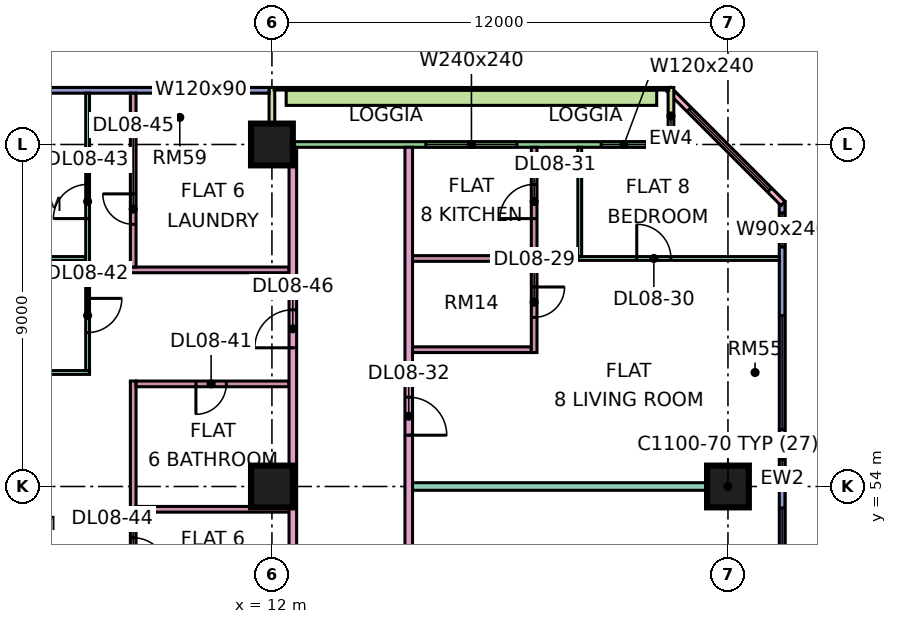
"""IFC4 building model, lengths in metres.
Left out: names, types, materials, properties, quantities, classifications, styles, units other than length and angle.
Written with IfcOpenShell. Run it as: python <this file> out.ifc"""

import sys

from ifc_helpers import new_model, si_unit, direction, frame, frame_2d, origin, origin_2d, place, context, subcontext, project, spatial, rectangle, extrude, element, fill, save


model = new_model("IFC4")
c1 = context("Model", 3, precision=1e-05, world=origin(), true_north=direction((0.0, 1.0)))
c2 = subcontext(c1, "Body", "Model", "MODEL_VIEW")
j1 = project(units=[si_unit("LENGTHUNIT", "METRE"), si_unit("PLANEANGLEUNIT", "RADIAN")], contexts=[c1])
p1 = place(None, origin())
s1 = spatial("IfcSite", under=j1, at=p1, CompositionType="ELEMENT")
p2 = place(p1, origin())
s2 = spatial("IfcBuilding", under=s1, at=p2, CompositionType="ELEMENT")
p3 = place(p2, frame((0.0, 0.0, 45.15)))
s3 = spatial("IfcBuildingStorey", under=s2, at=p3, CompositionType="ELEMENT", Elevation=45.15)
for number, where, z_axis, x_axis in (
    (1, (12.0, 54.0, 0.0), (0.0, 0.0, 1.0), (1.0, 0.0, 0.0)),
    (2, (12.0, 63.0, 0.0), (0.0, 0.0, 1.0), (1.0, 0.0, 0.0)),
    (3, (24.0, 54.0, 0.0), (0.0, 0.0, 1.0), (1.0, 0.0, 0.0)),
):
    element("IfcColumn", number, at=place(p3, frame(where, z_axis=z_axis, x_axis=x_axis)), inside=s3, PredefinedType="COLUMN", context=c2, shape_type="SweptSolid", body=[
        extrude(rectangle(XDim=1.1, YDim=1.1, at=origin_2d()), origin(), (0.0, 0.0, 1.0), 3.75),
    ])
p4 = place(p3, frame((25.425, 48.075, 0.0), z_axis=(0.0, 0.0, 1.0), x_axis=(0.0, 1.0, 0.0)))
e4 = element("IfcWall", 4, at=p4, inside=s3, PredefinedType="SOLIDWALL", context=c2, shape_type="SweptSolid", body=[
    extrude(rectangle(XDim=13.425, YDim=0.15, at=frame_2d((6.712, 0.0))), origin(), (0.0, 0.0, 1.0), 3.35),
])
p5 = place(p4, frame((0.562, 0.0, 0.45)))
e5 = element("IfcOpeningElement", 5, at=p5, cuts=e4, PredefinedType="OPENING", context=c2, shape_type="SweptSolid", body=[
    extrude(rectangle(XDim=4.8, YDim=2.4, at=frame_2d((2.4, 1.2))), frame((0.0, 0.085, 0.0), z_axis=(0.0, -1.0, 0.0), x_axis=(1.0, 0.0, 0.0)), (0.0, 0.0, 1.0), 0.17),
])
p6 = place(p4, frame((7.425, 0.0, 0.45)))
e6 = element("IfcOpeningElement", 6, at=p6, cuts=e4, PredefinedType="OPENING", context=c2, shape_type="SweptSolid", body=[
    extrude(rectangle(XDim=3.0, YDim=2.4, at=frame_2d((1.5, 1.2))), frame((0.0, 0.085, 0.0), z_axis=(0.0, -1.0, 0.0), x_axis=(1.0, 0.0, 0.0)), (0.0, 0.0, 1.0), 0.17),
])
p7 = place(p4, frame((12.225, 0.0, 0.45)))
e7 = element("IfcOpeningElement", 7, at=p7, cuts=e4, PredefinedType="OPENING", context=c2, shape_type="SweptSolid", body=[
    extrude(rectangle(XDim=0.9, YDim=2.4, at=frame_2d((0.45, 1.2))), frame((0.0, 0.085, 0.0), z_axis=(0.0, -1.0, 0.0), x_axis=(1.0, 0.0, 0.0)), (0.0, 0.0, 1.0), 0.17),
])
p8 = place(p3, frame((25.447, 61.447, 0.0), z_axis=(0.0, 0.0, 1.0), x_axis=(-0.707106781187, 0.707106781187, 0.0)))
e8 = element("IfcWall", 8, at=p8, inside=s3, PredefinedType="SOLIDWALL", context=c2, shape_type="SweptSolid", body=[
    extrude(rectangle(XDim=4.243, YDim=0.15, at=frame_2d((2.121, 0.0))), origin(), (0.0, 0.0, 1.0), 3.35),
])
p9 = place(p8, frame((0.498, 0.0, 0.45)))
e9 = element("IfcOpeningElement", 9, at=p9, cuts=e8, PredefinedType="OPENING", context=c2, shape_type="SweptSolid", body=[
    extrude(rectangle(XDim=3.0, YDim=2.4, at=frame_2d((1.5, 1.2))), frame((0.0, 0.085, 0.0), z_axis=(0.0, -1.0, 0.0), x_axis=(1.0, 0.0, 0.0)), (0.0, 0.0, 1.0), 0.17),
])
p10 = place(p3, frame((22.425, 63.0, 0.0), z_axis=(0.0, 0.0, 1.0), x_axis=(-1.0, 0.0, 0.0)))
e10 = element("IfcWall", 10, at=p10, inside=s3, PredefinedType="SOLIDWALL", context=c2, shape_type="SweptSolid", body=[
    extrude(rectangle(XDim=10.35, YDim=0.15, at=frame_2d((5.175, 0.0))), origin(), (0.0, 0.0, 1.0), 3.35),
])
p11 = place(p10, frame((0.562, 0.0, 0.45)))
e11 = element("IfcOpeningElement", 11, at=p11, cuts=e10, PredefinedType="OPENING", context=c2, shape_type="SweptSolid", body=[
    extrude(rectangle(XDim=1.2, YDim=2.4, at=frame_2d((0.6, 1.2))), frame((0.0, 0.085, 0.0), z_axis=(0.0, -1.0, 0.0), x_axis=(1.0, 0.0, 0.0)), (0.0, 0.0, 1.0), 0.17),
])
p12 = place(p10, frame((3.975, 0.0, 0.45)))
e12 = element("IfcOpeningElement", 12, at=p12, cuts=e10, PredefinedType="OPENING", context=c2, shape_type="SweptSolid", body=[
    extrude(rectangle(XDim=2.4, YDim=2.4, at=frame_2d((1.2, 1.2))), frame((0.0, 0.085, 0.0), z_axis=(0.0, -1.0, 0.0), x_axis=(1.0, 0.0, 0.0)), (0.0, 0.0, 1.0), 0.17),
])
for number, where, z_axis, x_axis in (
    (13, (22.5, 64.5, 0.0), (0.0, 0.0, 1.0), (0.0, -1.0, 0.0)),
    (14, (12.0, 64.5, 0.0), (0.0, 0.0, 1.0), (0.0, -1.0, 0.0)),
):
    element("IfcWall", number, at=place(p3, frame(where, z_axis=z_axis, x_axis=x_axis)), inside=s3, PredefinedType="SOLIDWALL", context=c2, shape_type="SweptSolid", body=[
        extrude(rectangle(XDim=1.5, YDim=0.15, at=frame_2d((0.75, 0.0))), origin(), (0.0, 0.0, 1.0), 3.35),
    ])
p13 = place(p3, frame((11.925, 64.425, 0.0), z_axis=(0.0, 0.0, 1.0), x_axis=(-1.0, 0.0, 0.0)))
e15 = element("IfcWall", 15, at=p13, inside=s3, PredefinedType="SOLIDWALL", context=c2, shape_type="SweptSolid", body=[
    extrude(rectangle(XDim=10.425, YDim=0.15, at=frame_2d((5.212, 0.0))), origin(), (0.0, 0.0, 1.0), 3.35),
])
p14 = place(p13, frame((1.188, 0.0, 1.7)))
e16 = element("IfcOpeningElement", 16, at=p14, cuts=e15, PredefinedType="OPENING", context=c2, shape_type="SweptSolid", body=[
    extrude(rectangle(XDim=1.2, YDim=0.9, at=frame_2d((0.6, 0.45))), frame((0.0, 0.085, 0.0), z_axis=(0.0, -1.0, 0.0), x_axis=(1.0, 0.0, 0.0)), (0.0, 0.0, 1.0), 0.17),
])
p15 = place(p13, frame((6.1, 0.0, 0.45)))
e17 = element("IfcOpeningElement", 17, at=p15, cuts=e15, PredefinedType="OPENING", context=c2, shape_type="SweptSolid", body=[
    extrude(rectangle(XDim=3.0, YDim=2.4, at=frame_2d((1.5, 1.2))), frame((0.0, 0.085, 0.0), z_axis=(0.0, -1.0, 0.0), x_axis=(1.0, 0.0, 0.0)), (0.0, 0.0, 1.0), 0.17),
])
p16 = place(p3, frame((22.125, 64.229, 0.0), z_axis=(0.0, 0.0, 1.0), x_axis=(-1.0, 0.0, 0.0)))
e18 = element("IfcWall", 18, at=p16, inside=s3, PredefinedType="SOLIDWALL", context=c2, shape_type="SweptSolid", body=[
    extrude(rectangle(XDim=9.75, YDim=0.4, at=frame_2d((4.875, 0.0))), origin(), (0.0, 0.0, 1.0), 0.7),
])
p17 = place(p3, frame((-1.351, 60.0, 0.0), z_axis=(0.0, 0.0, 1.0), x_axis=(1.0, 0.0, 0.0)))
e19 = element("IfcWall", 19, at=p17, inside=s3, PredefinedType="PARTITIONING", context=c2, shape_type="SweptSolid", body=[
    extrude(rectangle(XDim=8.451, YDim=0.1, at=frame_2d((4.226, 0.0))), origin(), (0.0, 0.0, 1.0), 3.35),
])
p18 = place(p3, frame((-1.35, 57.0, 0.0), z_axis=(0.0, 0.0, 1.0), x_axis=(1.0, 0.0, 0.0)))
e20 = element("IfcWall", 20, at=p18, inside=s3, PredefinedType="PARTITIONING", context=c2, shape_type="SweptSolid", body=[
    extrude(rectangle(XDim=8.55, YDim=0.1, at=frame_2d((4.275, 0.0))), origin(), (0.0, 0.0, 1.0), 3.35),
])
p19 = place(p3, frame((7.15, 57.05, 0.0), z_axis=(0.0, 0.0, 1.0), x_axis=(0.0, 1.0, 0.0)))
e21 = element("IfcWall", 21, at=p19, inside=s3, PredefinedType="PARTITIONING", context=c2, shape_type="SweptSolid", body=[
    extrude(rectangle(XDim=7.3, YDim=0.1, at=frame_2d((3.65, 0.0))), origin(), (0.0, 0.0, 1.0), 3.35),
])
p20 = place(p19, frame((1.0, 0.0, 0.0)))
e22 = element("IfcOpeningElement", 22, at=p20, cuts=e21, PredefinedType="OPENING", context=c2, shape_type="SweptSolid", body=[
    extrude(rectangle(XDim=0.9, YDim=2.1, at=frame_2d((0.45, 1.05))), frame((0.0, 0.06, 0.0), z_axis=(0.0, -1.0, 0.0), x_axis=(1.0, 0.0, 0.0)), (0.0, 0.0, 1.0), 0.12),
])
p21 = place(p19, frame((4.0, 0.0, 0.0)))
e23 = element("IfcOpeningElement", 23, at=p21, cuts=e21, PredefinedType="OPENING", context=c2, shape_type="SweptSolid", body=[
    extrude(rectangle(XDim=0.9, YDim=2.1, at=frame_2d((0.45, 1.05))), frame((0.0, 0.06, 0.0), z_axis=(0.0, -1.0, 0.0), x_axis=(1.0, 0.0, 0.0)), (0.0, 0.0, 1.0), 0.12),
])
p22 = place(p3, frame((8.275, 59.7, 0.0), z_axis=(0.0, 0.0, 1.0), x_axis=(1.0, 0.0, 0.0)))
e24 = element("IfcWall", 24, at=p22, inside=s3, PredefinedType="PARTITIONING", context=c2, shape_type="SweptSolid", body=[
    extrude(rectangle(XDim=4.175, YDim=0.15, at=frame_2d((2.087, 0.0))), origin(), (0.0, 0.0, 1.0), 3.35),
])
p23 = place(p3, frame((8.35, 51.1, 0.0), z_axis=(0.0, 0.0, 1.0), x_axis=(0.0, 1.0, 0.0)))
e25 = element("IfcWall", 25, at=p23, inside=s3, PredefinedType="PARTITIONING", context=c2, shape_type="SweptSolid", body=[
    extrude(rectangle(XDim=5.675, YDim=0.15, at=frame_2d((2.837, 0.0))), origin(), (0.0, 0.0, 1.0), 3.35),
])
p24 = place(p23, frame((0.65, 0.0, 0.0)))
e26 = element("IfcOpeningElement", 26, at=p24, cuts=e25, PredefinedType="OPENING", context=c2, shape_type="SweptSolid", body=[
    extrude(rectangle(XDim=0.9, YDim=2.1, at=frame_2d((0.45, 1.05))), frame((0.0, 0.085, 0.0), z_axis=(0.0, -1.0, 0.0), x_axis=(1.0, 0.0, 0.0)), (0.0, 0.0, 1.0), 0.17),
])
p25 = place(p3, frame((8.35, 59.775, 0.0), z_axis=(0.0, 0.0, 1.0), x_axis=(0.0, 1.0, 0.0)))
e27 = element("IfcWall", 27, at=p25, inside=s3, PredefinedType="PARTITIONING", context=c2, shape_type="SweptSolid", body=[
    extrude(rectangle(XDim=4.575, YDim=0.15, at=frame_2d((2.288, 0.0))), origin(), (0.0, 0.0, 1.0), 3.35),
])
p26 = place(p25, frame((1.125, 0.0, 0.0)))
e28 = element("IfcOpeningElement", 28, at=p26, cuts=e27, PredefinedType="OPENING", context=c2, shape_type="SweptSolid", body=[
    extrude(rectangle(XDim=0.8, YDim=2.1, at=frame_2d((0.4, 1.05))), frame((0.0, 0.085, 0.0), z_axis=(0.0, -1.0, 0.0), x_axis=(1.0, 0.0, 0.0)), (0.0, 0.0, 1.0), 0.17),
])
p27 = place(p3, frame((8.425, 53.4, 0.0), z_axis=(0.0, 0.0, 1.0), x_axis=(1.0, 0.0, 0.0)))
e29 = element("IfcWall", 29, at=p27, inside=s3, PredefinedType="PARTITIONING", context=c2, shape_type="SweptSolid", body=[
    extrude(rectangle(XDim=4.025, YDim=0.15, at=frame_2d((2.012, 0.0))), origin(), (0.0, 0.0, 1.0), 3.35),
])
p28 = place(p3, frame((8.425, 56.7, 0.0), z_axis=(0.0, 0.0, 1.0), x_axis=(1.0, 0.0, 0.0)))
e30 = element("IfcWall", 30, at=p28, inside=s3, PredefinedType="PARTITIONING", context=c2, shape_type="SweptSolid", body=[
    extrude(rectangle(XDim=4.025, YDim=0.15, at=frame_2d((2.012, 0.0))), origin(), (0.0, 0.0, 1.0), 3.35),
])
p29 = place(p28, frame((1.575, 0.0, 0.0)))
e31 = element("IfcOpeningElement", 31, at=p29, cuts=e30, PredefinedType="OPENING", context=c2, shape_type="SweptSolid", body=[
    extrude(rectangle(XDim=0.8, YDim=2.1, at=frame_2d((0.4, 1.05))), frame((0.0, 0.085, 0.0), z_axis=(0.0, -1.0, 0.0), x_axis=(1.0, 0.0, 0.0)), (0.0, 0.0, 1.0), 0.17),
])
p30 = place(p3, frame((12.55, 20.0, 0.0), z_axis=(0.0, 0.0, 1.0), x_axis=(0.0, 1.0, 0.0)))
e32 = element("IfcWall", 32, at=p30, inside=s3, PredefinedType="PARTITIONING", context=c2, shape_type="SweptSolid", body=[
    extrude(rectangle(XDim=42.926, YDim=0.2, at=frame_2d((21.463, 0.0))), origin(), (0.0, 0.0, 1.0), 3.35),
])
p31 = place(p30, frame((25.8, 0.0, 0.0)))
e33 = element("IfcOpeningElement", 33, at=p31, cuts=e32, PredefinedType="OPENING", context=c2, shape_type="SweptSolid", body=[
    extrude(rectangle(XDim=1.0, YDim=2.1, at=frame_2d((0.5, 1.05))), frame((0.0, 0.11, 0.0), z_axis=(0.0, -1.0, 0.0), x_axis=(1.0, 0.0, 0.0)), (0.0, 0.0, 1.0), 0.22),
])
p32 = place(p30, frame((37.65, 0.0, 0.0)))
e34 = element("IfcOpeningElement", 34, at=p32, cuts=e32, PredefinedType="OPENING", context=c2, shape_type="SweptSolid", body=[
    extrude(rectangle(XDim=1.0, YDim=2.1, at=frame_2d((0.5, 1.05))), frame((0.0, 0.11, 0.0), z_axis=(0.0, -1.0, 0.0), x_axis=(1.0, 0.0, 0.0)), (0.0, 0.0, 1.0), 0.22),
])
p33 = place(p30, frame((0.6, 0.0, 0.0)))
e35 = element("IfcOpeningElement", 35, at=p33, cuts=e32, PredefinedType="OPENING", context=c2, shape_type="SweptSolid", body=[
    extrude(rectangle(XDim=1.2, YDim=2.1, at=frame_2d((0.6, 1.05))), frame((0.0, 0.11, 0.0), z_axis=(0.0, -1.0, 0.0), x_axis=(1.0, 0.0, 0.0)), (0.0, 0.0, 1.0), 0.22),
])
p34 = place(p30, frame((4.65, 0.0, 0.0)))
e36 = element("IfcOpeningElement", 36, at=p34, cuts=e32, PredefinedType="OPENING", context=c2, shape_type="SweptSolid", body=[
    extrude(rectangle(XDim=1.0, YDim=2.1, at=frame_2d((0.5, 1.05))), frame((0.0, 0.11, 0.0), z_axis=(0.0, -1.0, 0.0), x_axis=(1.0, 0.0, 0.0)), (0.0, 0.0, 1.0), 0.22),
])
p35 = place(p3, frame((15.6, 51.225, 0.0), z_axis=(0.0, 0.0, 1.0), x_axis=(0.0, 1.0, 0.0)))
e37 = element("IfcWall", 37, at=p35, inside=s3, PredefinedType="PARTITIONING", context=c2, shape_type="SweptSolid", body=[
    extrude(rectangle(XDim=11.701, YDim=0.2, at=frame_2d((5.851, 0.0))), origin(), (0.0, 0.0, 1.0), 3.35),
])
p36 = place(p35, frame((4.125, 0.0, 0.0)))
e38 = element("IfcOpeningElement", 38, at=p36, cuts=e37, PredefinedType="OPENING", context=c2, shape_type="SweptSolid", body=[
    extrude(rectangle(XDim=1.0, YDim=2.1, at=frame_2d((0.5, 1.05))), frame((0.0, 0.11, 0.0), z_axis=(0.0, -1.0, 0.0), x_axis=(1.0, 0.0, 0.0)), (0.0, 0.0, 1.0), 0.22),
])
p37 = place(p3, frame((15.7, 54.0, 0.0), z_axis=(0.0, 0.0, 1.0), x_axis=(1.0, 0.0, 0.0)))
e39 = element("IfcWall", 39, at=p37, inside=s3, PredefinedType="PARTITIONING", context=c2, shape_type="SweptSolid", body=[
    extrude(rectangle(XDim=8.3, YDim=0.2, at=frame_2d((4.15, 0.0))), origin(), (0.0, 0.0, 1.0), 3.35),
])
for number, where, z_axis, x_axis in (
    (40, (15.7, 57.6, 0.0), (0.0, 0.0, 1.0), (1.0, 0.0, 0.0)),
    (41, (15.7, 60.0, 0.0), (0.0, 0.0, 1.0), (1.0, 0.0, 0.0)),
):
    element("IfcWall", number, at=place(p3, frame(where, z_axis=z_axis, x_axis=x_axis)), inside=s3, PredefinedType="PARTITIONING", context=c2, shape_type="SweptSolid", body=[
        extrude(rectangle(XDim=3.125, YDim=0.15, at=frame_2d((1.562, 0.0))), origin(), (0.0, 0.0, 1.0), 3.35),
    ])
p38 = place(p3, frame((18.9, 57.525, 0.0), z_axis=(0.0, 0.0, 1.0), x_axis=(0.0, 1.0, 0.0)))
e42 = element("IfcWall", 42, at=p38, inside=s3, PredefinedType="PARTITIONING", context=c2, shape_type="SweptSolid", body=[
    extrude(rectangle(XDim=5.401, YDim=0.15, at=frame_2d((2.701, 0.0))), origin(), (0.0, 0.0, 1.0), 3.35),
])
p39 = place(p38, frame((0.925, 0.0, 0.0)))
e43 = element("IfcOpeningElement", 43, at=p39, cuts=e42, PredefinedType="OPENING", context=c2, shape_type="SweptSolid", body=[
    extrude(rectangle(XDim=0.8, YDim=2.1, at=frame_2d((0.4, 1.05))), frame((0.0, 0.085, 0.0), z_axis=(0.0, -1.0, 0.0), x_axis=(1.0, 0.0, 0.0)), (0.0, 0.0, 1.0), 0.17),
])
p40 = place(p38, frame((3.525, 0.0, 0.0)))
e44 = element("IfcOpeningElement", 44, at=p40, cuts=e42, PredefinedType="OPENING", context=c2, shape_type="SweptSolid", body=[
    extrude(rectangle(XDim=0.9, YDim=2.1, at=frame_2d((0.45, 1.05))), frame((0.0, 0.085, 0.0), z_axis=(0.0, -1.0, 0.0), x_axis=(1.0, 0.0, 0.0)), (0.0, 0.0, 1.0), 0.17),
])
p41 = place(p3, frame((20.05, 60.0, 0.0), z_axis=(0.0, 0.0, 1.0), x_axis=(1.0, 0.0, 0.0)))
e45 = element("IfcWall", 45, at=p41, inside=s3, PredefinedType="PARTITIONING", context=c2, shape_type="SweptSolid", body=[
    extrude(rectangle(XDim=5.3, YDim=0.1, at=frame_2d((2.65, 0.0))), origin(), (0.0, 0.0, 1.0), 3.35),
])
p42 = place(p41, frame((1.55, 0.0, 0.0)))
e46 = element("IfcOpeningElement", 46, at=p42, cuts=e45, PredefinedType="OPENING", context=c2, shape_type="SweptSolid", body=[
    extrude(rectangle(XDim=0.9, YDim=2.1, at=frame_2d((0.45, 1.05))), frame((0.0, 0.06, 0.0), z_axis=(0.0, -1.0, 0.0), x_axis=(1.0, 0.0, 0.0)), (0.0, 0.0, 1.0), 0.12),
])
p43 = place(p3, frame((20.1, 60.05, 0.0), z_axis=(0.0, 0.0, 1.0), x_axis=(0.0, 1.0, 0.0)))
e47 = element("IfcWall", 47, at=p43, inside=s3, PredefinedType="PARTITIONING", context=c2, shape_type="SweptSolid", body=[
    extrude(rectangle(XDim=2.876, YDim=0.1, at=frame_2d((1.438, 0.0))), origin(), (0.0, 0.0, 1.0), 3.35),
])
p44 = place(p5, origin())
e48 = element("IfcWindow", 48, at=p44, inside=s3, PartitioningType="SINGLE_PANEL", PredefinedType="WINDOW", context=c2, shape_type="SweptSolid", body=[
    extrude(rectangle(XDim=4.8, YDim=2.4, at=frame_2d((2.4, 1.2))), frame((0.0, 0.03, 0.0), z_axis=(0.0, -1.0, 0.0), x_axis=(1.0, 0.0, 0.0)), (0.0, 0.0, 1.0), 0.06),
])
fill(e5, e48)
p45 = place(p6, origin())
e49 = element("IfcWindow", 49, at=p45, inside=s3, PartitioningType="SINGLE_PANEL", PredefinedType="WINDOW", context=c2, shape_type="SweptSolid", body=[
    extrude(rectangle(XDim=3.0, YDim=2.4, at=frame_2d((1.5, 1.2))), frame((0.0, 0.03, 0.0), z_axis=(0.0, -1.0, 0.0), x_axis=(1.0, 0.0, 0.0)), (0.0, 0.0, 1.0), 0.06),
])
fill(e6, e49)
p46 = place(p7, origin())
e50 = element("IfcWindow", 50, at=p46, inside=s3, PartitioningType="SINGLE_PANEL", PredefinedType="WINDOW", context=c2, shape_type="SweptSolid", body=[
    extrude(rectangle(XDim=0.9, YDim=2.4, at=frame_2d((0.45, 1.2))), frame((0.0, 0.03, 0.0), z_axis=(0.0, -1.0, 0.0), x_axis=(1.0, 0.0, 0.0)), (0.0, 0.0, 1.0), 0.06),
])
fill(e7, e50)
p47 = place(p9, origin())
e51 = element("IfcWindow", 51, at=p47, inside=s3, PartitioningType="SINGLE_PANEL", PredefinedType="WINDOW", context=c2, shape_type="SweptSolid", body=[
    extrude(rectangle(XDim=3.0, YDim=2.4, at=frame_2d((1.5, 1.2))), frame((0.0, 0.03, 0.0), z_axis=(0.0, -1.0, 0.0), x_axis=(1.0, 0.0, 0.0)), (0.0, 0.0, 1.0), 0.06),
])
fill(e9, e51)
p48 = place(p11, origin())
e52 = element("IfcWindow", 52, at=p48, inside=s3, PartitioningType="SINGLE_PANEL", PredefinedType="WINDOW", context=c2, shape_type="SweptSolid", body=[
    extrude(rectangle(XDim=1.2, YDim=2.4, at=frame_2d((0.6, 1.2))), frame((0.0, 0.03, 0.0), z_axis=(0.0, -1.0, 0.0), x_axis=(1.0, 0.0, 0.0)), (0.0, 0.0, 1.0), 0.06),
])
fill(e11, e52)
p49 = place(p12, origin())
e53 = element("IfcWindow", 53, at=p49, inside=s3, PartitioningType="SINGLE_PANEL", PredefinedType="WINDOW", context=c2, shape_type="SweptSolid", body=[
    extrude(rectangle(XDim=2.4, YDim=2.4, at=frame_2d((1.2, 1.2))), frame((0.0, 0.03, 0.0), z_axis=(0.0, -1.0, 0.0), x_axis=(1.0, 0.0, 0.0)), (0.0, 0.0, 1.0), 0.06),
])
fill(e12, e53)
p50 = place(p14, origin())
e54 = element("IfcWindow", 54, at=p50, inside=s3, PartitioningType="SINGLE_PANEL", PredefinedType="WINDOW", context=c2, shape_type="SweptSolid", body=[
    extrude(rectangle(XDim=1.2, YDim=0.9, at=frame_2d((0.6, 0.45))), frame((0.0, 0.03, 0.0), z_axis=(0.0, -1.0, 0.0), x_axis=(1.0, 0.0, 0.0)), (0.0, 0.0, 1.0), 0.06),
])
fill(e16, e54)
p51 = place(p39, origin())
e55 = element("IfcDoor", 55, at=p51, inside=s3, OperationType="SINGLE_SWING_RIGHT", PredefinedType="DOOR", context=c2, shape_type="SweptSolid", body=[
    extrude(rectangle(XDim=0.8, YDim=2.1, at=frame_2d((0.4, 1.05))), frame((0.0, 0.025, 0.0), z_axis=(0.0, -1.0, 0.0), x_axis=(1.0, 0.0, 0.0)), (0.0, 0.0, 1.0), 0.05),
])
fill(e43, e55)
p52 = place(p42, origin())
e56 = element("IfcDoor", 56, at=p52, inside=s3, OperationType="SINGLE_SWING_LEFT", PredefinedType="DOOR", context=c2, shape_type="SweptSolid", body=[
    extrude(rectangle(XDim=0.9, YDim=2.1, at=frame_2d((0.45, 1.05))), frame((0.0, 0.025, 0.0), z_axis=(0.0, -1.0, 0.0), x_axis=(1.0, 0.0, 0.0)), (0.0, 0.0, 1.0), 0.05),
])
fill(e46, e56)
p53 = place(p40, origin())
e57 = element("IfcDoor", 57, at=p53, inside=s3, OperationType="SINGLE_SWING_LEFT", PredefinedType="DOOR", context=c2, shape_type="SweptSolid", body=[
    extrude(rectangle(XDim=0.9, YDim=2.1, at=frame_2d((0.45, 1.05))), frame((0.0, 0.025, 0.0), z_axis=(0.0, -1.0, 0.0), x_axis=(1.0, 0.0, 0.0)), (0.0, 0.0, 1.0), 0.05),
])
fill(e44, e57)
p54 = place(p36, frame((1.0, 0.0, 0.0), z_axis=(0.0, 0.0, 1.0), x_axis=(-1.0, 0.0, 0.0)))
e58 = element("IfcDoor", 58, at=p54, inside=s3, OperationType="SINGLE_SWING_LEFT", PredefinedType="DOOR", context=c2, shape_type="SweptSolid", body=[
    extrude(rectangle(XDim=1.0, YDim=2.1, at=frame_2d((0.5, 1.05))), frame((0.0, 0.025, 0.0), z_axis=(0.0, -1.0, 0.0), x_axis=(1.0, 0.0, 0.0)), (0.0, 0.0, 1.0), 0.05),
])
fill(e38, e58)
p55 = place(p29, frame((0.8, 0.0, 0.0), z_axis=(0.0, 0.0, 1.0), x_axis=(-1.0, 0.0, 0.0)))
e59 = element("IfcDoor", 59, at=p55, inside=s3, OperationType="SINGLE_SWING_LEFT", PredefinedType="DOOR", context=c2, shape_type="SweptSolid", body=[
    extrude(rectangle(XDim=0.8, YDim=2.1, at=frame_2d((0.4, 1.05))), frame((0.0, 0.025, 0.0), z_axis=(0.0, -1.0, 0.0), x_axis=(1.0, 0.0, 0.0)), (0.0, 0.0, 1.0), 0.05),
])
fill(e31, e59)
p56 = place(p20, origin())
e60 = element("IfcDoor", 60, at=p56, inside=s3, OperationType="SINGLE_SWING_RIGHT", PredefinedType="DOOR", context=c2, shape_type="SweptSolid", body=[
    extrude(rectangle(XDim=0.9, YDim=2.1, at=frame_2d((0.45, 1.05))), frame((0.0, 0.025, 0.0), z_axis=(0.0, -1.0, 0.0), x_axis=(1.0, 0.0, 0.0)), (0.0, 0.0, 1.0), 0.05),
])
fill(e22, e60)
p57 = place(p21, origin())
e61 = element("IfcDoor", 61, at=p57, inside=s3, OperationType="SINGLE_SWING_LEFT", PredefinedType="DOOR", context=c2, shape_type="SweptSolid", body=[
    extrude(rectangle(XDim=0.9, YDim=2.1, at=frame_2d((0.45, 1.05))), frame((0.0, 0.025, 0.0), z_axis=(0.0, -1.0, 0.0), x_axis=(1.0, 0.0, 0.0)), (0.0, 0.0, 1.0), 0.05),
])
fill(e23, e61)
p58 = place(p24, frame((0.9, 0.0, 0.0), z_axis=(0.0, 0.0, 1.0), x_axis=(-1.0, 0.0, 0.0)))
e62 = element("IfcDoor", 62, at=p58, inside=s3, OperationType="SINGLE_SWING_LEFT", PredefinedType="DOOR", context=c2, shape_type="SweptSolid", body=[
    extrude(rectangle(XDim=0.9, YDim=2.1, at=frame_2d((0.45, 1.05))), frame((0.0, 0.025, 0.0), z_axis=(0.0, -1.0, 0.0), x_axis=(1.0, 0.0, 0.0)), (0.0, 0.0, 1.0), 0.05),
])
fill(e26, e62)
p59 = place(p26, frame((0.8, 0.0, 0.0), z_axis=(0.0, 0.0, 1.0), x_axis=(-1.0, 0.0, 0.0)))
e63 = element("IfcDoor", 63, at=p59, inside=s3, OperationType="SINGLE_SWING_RIGHT", PredefinedType="DOOR", context=c2, shape_type="SweptSolid", body=[
    extrude(rectangle(XDim=0.8, YDim=2.1, at=frame_2d((0.4, 1.05))), frame((0.0, 0.025, 0.0), z_axis=(0.0, -1.0, 0.0), x_axis=(1.0, 0.0, 0.0)), (0.0, 0.0, 1.0), 0.05),
])
fill(e28, e63)
p60 = place(p32, origin())
e64 = element("IfcDoor", 64, at=p60, inside=s3, OperationType="SINGLE_SWING_LEFT", PredefinedType="DOOR", context=c2, shape_type="SweptSolid", body=[
    extrude(rectangle(XDim=1.0, YDim=2.1, at=frame_2d((0.5, 1.05))), frame((0.0, 0.025, 0.0), z_axis=(0.0, -1.0, 0.0), x_axis=(1.0, 0.0, 0.0)), (0.0, 0.0, 1.0), 0.05),
])
fill(e34, e64)
save(model, sys.argv[1])
